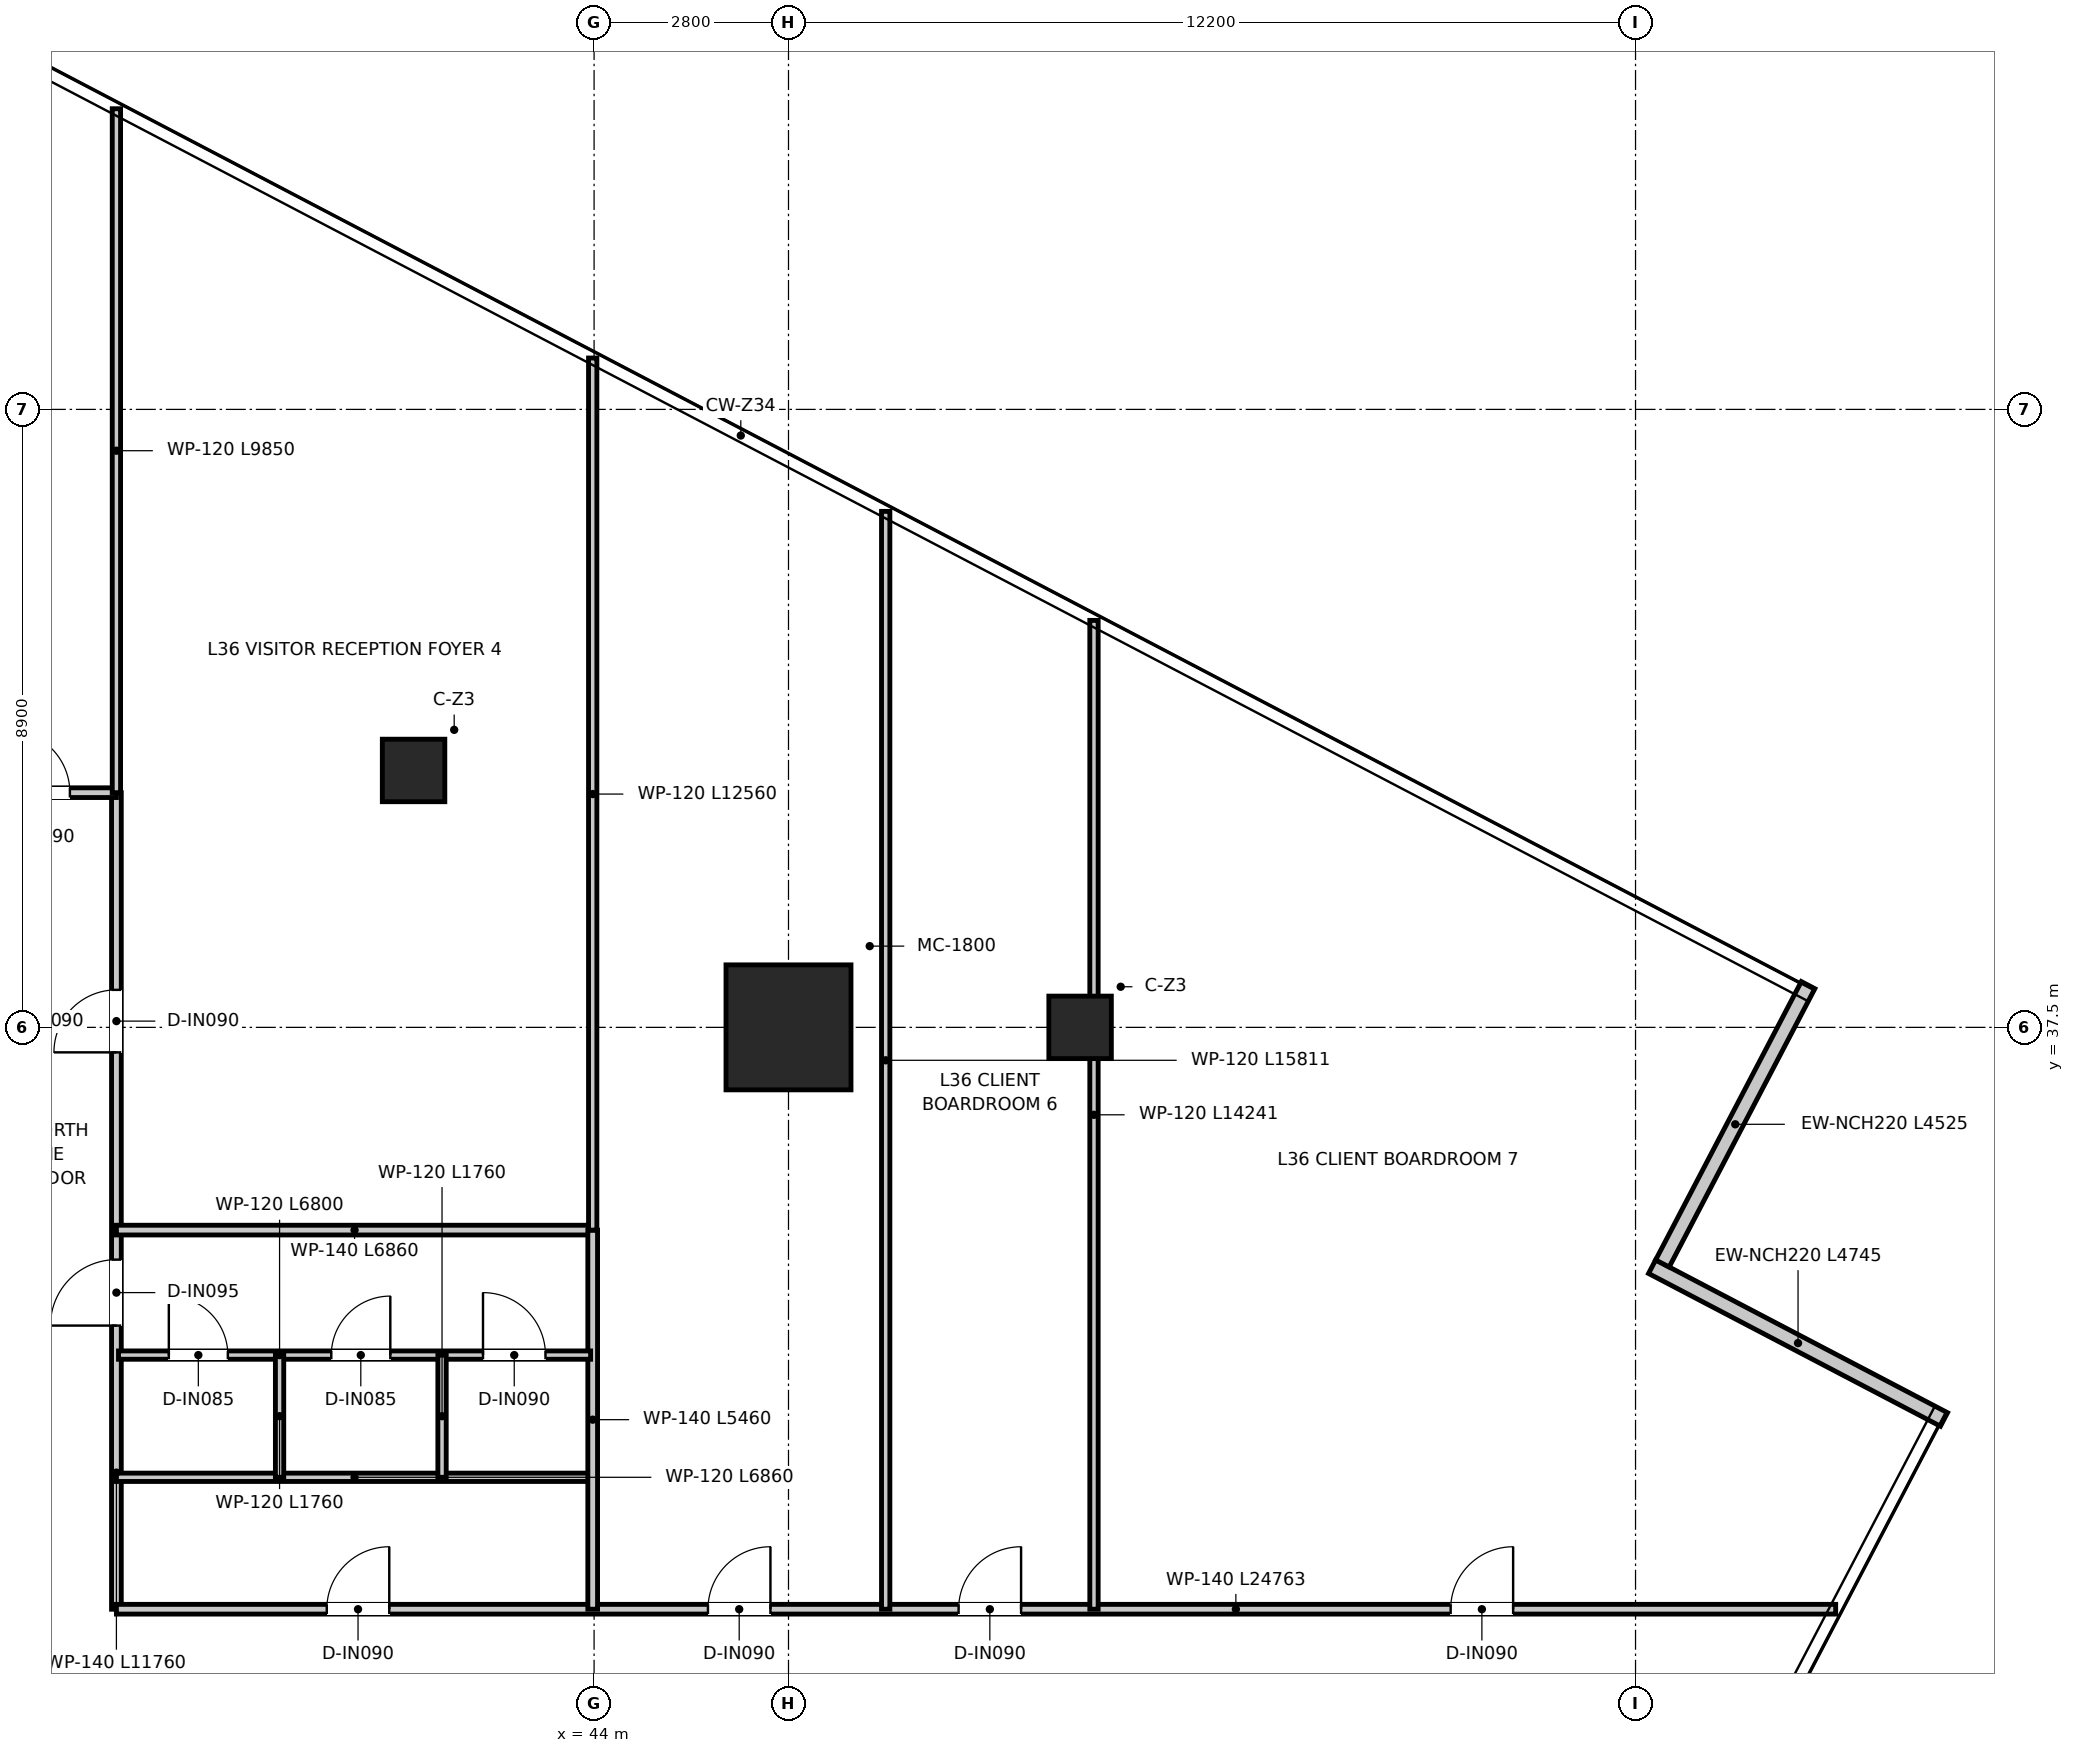
"""IFC4 building model, lengths in metres.
Left out: names, types, materials, properties, quantities, classifications, styles, units other than length and angle.
Written with IfcOpenShell. Run it as: python <this file> out.ifc"""

import sys

from ifc_helpers import new_model, si_unit, direction, frame, frame_2d, origin, origin_2d, place, context, subcontext, project, spatial, rectangle, extrude, source, transform, mapped, element, fill, save


model = new_model("IFC4")
c1 = context("Model", 3, precision=1e-05, world=origin(), true_north=direction((0.0, 1.0)))
c2 = subcontext(c1, "Body", "Model", "MODEL_VIEW")
j1 = project(units=[si_unit("LENGTHUNIT", "METRE"), si_unit("PLANEANGLEUNIT", "RADIAN")], contexts=[c1])
p1 = place(None, origin())
s1 = spatial("IfcSite", under=j1, at=p1, CompositionType="ELEMENT")
p2 = place(p1, origin())
s2 = spatial("IfcBuilding", under=s1, at=p2, CompositionType="ELEMENT")
p3 = place(p2, frame((0.0, 0.0, 150.15)))
s3 = spatial("IfcBuildingStorey", under=s2, at=p3, CompositionType="ELEMENT", Elevation=150.15)
m1 = source(origin(), c2, "Body", "SweptSolid", [
    extrude(rectangle(XDim=1.8, YDim=1.8, at=origin_2d()), origin(), (0.0, 0.0, 1.0), 3.95),
])
p4 = place(p3, frame((46.8, 37.5, 0.0), z_axis=(0.0, 0.0, 1.0), x_axis=(1.0, 0.0, 0.0)))
e1 = element("IfcColumn", 1, at=p4, inside=s3, PredefinedType="USERDEFINED", context=c2, shape_type="MappedRepresentation", body=[
    mapped(m1, transform((0.0, 0.0, 0.0), x_axis=(1.0, 0.0, 0.0), y_axis=(0.0, 1.0, 0.0), z_axis=(0.0, 0.0, 1.0), scale=1.0)),
])
m2 = source(origin(), c2, "Body", "SweptSolid", [
    extrude(rectangle(XDim=0.9, YDim=0.9, at=origin_2d()), origin(), (0.0, 0.0, 1.0), 3.95),
])
for number, where, z_axis, x_axis in (
    (2, (41.4, 41.2, 0.0), (0.0, 0.0, 1.0), (1.0, 0.0, 0.0)),
    (3, (51.0, 37.5, 0.0), (0.0, 0.0, 1.0), (1.0, 0.0, 0.0)),
):
    element("IfcColumn", number, at=place(p3, frame(where, z_axis=z_axis, x_axis=x_axis)), inside=s3, PredefinedType="COLUMN", context=c2, shape_type="MappedRepresentation", body=[
        mapped(m2, transform((0.0, 0.0, 0.0), x_axis=(1.0, 0.0, 0.0), y_axis=(0.0, 1.0, 0.0), z_axis=(0.0, 0.0, 1.0), scale=1.0)),
    ])
p5 = place(p3, frame((63.443, 31.853, 0.0), z_axis=(0.0, 0.0, 1.0), x_axis=(-0.886000663224, 0.463683970788, 0.0)))
e4 = element("IfcWall", 4, at=p5, inside=s3, PredefinedType="ELEMENTEDWALL", context=c2, shape_type="SweptSolid", body=[
    extrude(rectangle(XDim=4.745, YDim=0.22, at=frame_2d((2.373, 0.0))), origin(), (0.0, 0.0, 1.0), 3.67),
])
p6 = place(p3, frame((59.387, 34.099, 0.0), z_axis=(0.0, 0.0, 1.0), x_axis=(0.463690434653, 0.885997280363, 0.0)))
e5 = element("IfcWall", 5, at=p6, inside=s3, PredefinedType="ELEMENTEDWALL", context=c2, shape_type="SweptSolid", body=[
    extrude(rectangle(XDim=4.525, YDim=0.22, at=frame_2d((2.262, 0.0))), origin(), (0.0, 0.0, 1.0), 3.67),
])
p7 = place(p3, frame((37.12, 29.12, 0.0), z_axis=(0.0, 0.0, 1.0), x_axis=(0.0, 1.0, 0.0)))
e6 = element("IfcWall", 6, at=p7, inside=s3, PredefinedType="PARTITIONING", context=c2, shape_type="SweptSolid", body=[
    extrude(rectangle(XDim=11.76, YDim=0.14, at=frame_2d((5.88, 0.0))), origin(), (0.0, 0.0, 1.0), 3.03),
])
p8 = place(p7, frame((4.085, 0.0, 0.0)))
e7 = element("IfcOpeningElement", 7, at=p8, cuts=e6, PredefinedType="OPENING", context=c2, shape_type="SweptSolid", body=[
    extrude(rectangle(XDim=0.95, YDim=2.1, at=frame_2d((0.475, 1.05))), frame((0.0, 0.08, 0.0), z_axis=(0.0, -1.0, 0.0), x_axis=(1.0, 0.0, 0.0)), (0.0, 0.0, 1.0), 0.16),
])
p9 = place(p7, frame((8.02, 0.0, 0.0)))
e8 = element("IfcOpeningElement", 8, at=p9, cuts=e6, PredefinedType="OPENING", context=c2, shape_type="SweptSolid", body=[
    extrude(rectangle(XDim=0.9, YDim=2.1, at=frame_2d((0.45, 1.05))), frame((0.0, 0.08, 0.0), z_axis=(0.0, -1.0, 0.0), x_axis=(1.0, 0.0, 0.0)), (0.0, 0.0, 1.0), 0.16),
])
p10 = place(p3, frame((34.88, 40.88, 0.0), z_axis=(0.0, 0.0, 1.0), x_axis=(1.0, 0.0, 0.0)))
e9 = element("IfcWall", 9, at=p10, inside=s3, PredefinedType="PARTITIONING", context=c2, shape_type="SweptSolid", body=[
    extrude(rectangle(XDim=2.24, YDim=0.14, at=frame_2d((1.12, 0.0))), origin(), (0.0, 0.0, 1.0), 3.67),
])
p11 = place(p10, frame((0.67, 0.0, 0.0)))
e10 = element("IfcOpeningElement", 10, at=p11, cuts=e9, PredefinedType="OPENING", context=c2, shape_type="SweptSolid", body=[
    extrude(rectangle(XDim=0.9, YDim=2.1, at=frame_2d((0.45, 1.05))), frame((0.0, 0.08, 0.0), z_axis=(0.0, -1.0, 0.0), x_axis=(1.0, 0.0, 0.0)), (0.0, 0.0, 1.0), 0.16),
])
p12 = place(p3, frame((37.12, 29.12, 0.0), z_axis=(0.0, 0.0, 1.0), x_axis=(1.0, 0.0, 0.0)))
e11 = element("IfcWall", 11, at=p12, inside=s3, PredefinedType="PARTITIONING", context=c2, shape_type="SweptSolid", body=[
    extrude(rectangle(XDim=24.763, YDim=0.14, at=frame_2d((12.381, 0.0))), origin(), (0.0, 0.0, 1.0), 3.03),
])
p13 = place(p12, frame((3.03, 0.0, 0.0)))
e12 = element("IfcOpeningElement", 12, at=p13, cuts=e11, PredefinedType="OPENING", context=c2, shape_type="SweptSolid", body=[
    extrude(rectangle(XDim=0.9, YDim=2.1, at=frame_2d((0.45, 1.05))), frame((0.0, 0.08, 0.0), z_axis=(0.0, -1.0, 0.0), x_axis=(1.0, 0.0, 0.0)), (0.0, 0.0, 1.0), 0.16),
])
p14 = place(p12, frame((8.52, 0.0, 0.0)))
e13 = element("IfcOpeningElement", 13, at=p14, cuts=e11, PredefinedType="OPENING", context=c2, shape_type="SweptSolid", body=[
    extrude(rectangle(XDim=0.9, YDim=2.1, at=frame_2d((0.45, 1.05))), frame((0.0, 0.08, 0.0), z_axis=(0.0, -1.0, 0.0), x_axis=(1.0, 0.0, 0.0)), (0.0, 0.0, 1.0), 0.16),
])
p15 = place(p12, frame((12.13, 0.0, 0.0)))
e14 = element("IfcOpeningElement", 14, at=p15, cuts=e11, PredefinedType="OPENING", context=c2, shape_type="SweptSolid", body=[
    extrude(rectangle(XDim=0.9, YDim=2.1, at=frame_2d((0.45, 1.05))), frame((0.0, 0.08, 0.0), z_axis=(0.0, -1.0, 0.0), x_axis=(1.0, 0.0, 0.0)), (0.0, 0.0, 1.0), 0.16),
])
p16 = place(p12, frame((19.217, 0.0, 0.0)))
e15 = element("IfcOpeningElement", 15, at=p16, cuts=e11, PredefinedType="OPENING", context=c2, shape_type="SweptSolid", body=[
    extrude(rectangle(XDim=0.9, YDim=2.1, at=frame_2d((0.45, 1.05))), frame((0.0, 0.08, 0.0), z_axis=(0.0, -1.0, 0.0), x_axis=(1.0, 0.0, 0.0)), (0.0, 0.0, 1.0), 0.16),
])
p17 = place(p3, frame((37.12, 31.02, 0.0), z_axis=(0.0, 0.0, 1.0), x_axis=(1.0, 0.0, 0.0)))
e16 = element("IfcWall", 16, at=p17, inside=s3, PredefinedType="PARTITIONING", context=c2, shape_type="SweptSolid", body=[
    extrude(rectangle(XDim=6.86, YDim=0.12, at=frame_2d((3.43, 0.0))), origin(), (0.0, 0.0, 1.0), 3.08),
])
p18 = place(p3, frame((37.12, 34.58, 0.0), z_axis=(0.0, 0.0, 1.0), x_axis=(1.0, 0.0, 0.0)))
e17 = element("IfcWall", 17, at=p18, inside=s3, PredefinedType="PARTITIONING", context=c2, shape_type="SweptSolid", body=[
    extrude(rectangle(XDim=6.86, YDim=0.14, at=frame_2d((3.43, 0.0))), origin(), (0.0, 0.0, 1.0), 3.08),
])
p19 = place(p3, frame((43.98, 29.12, 0.0), z_axis=(0.0, 0.0, 1.0), x_axis=(0.0, 1.0, 0.0)))
e18 = element("IfcWall", 18, at=p19, inside=s3, PredefinedType="PARTITIONING", context=c2, shape_type="SweptSolid", body=[
    extrude(rectangle(XDim=5.46, YDim=0.14, at=frame_2d((2.73, 0.0))), origin(), (0.0, 0.0, 1.0), 3.31),
])
p20 = place(p3, frame((37.15, 32.78, 0.0), z_axis=(0.0, 0.0, 1.0), x_axis=(1.0, 0.0, 0.0)))
e19 = element("IfcWall", 19, at=p20, inside=s3, PredefinedType="PARTITIONING", context=c2, shape_type="SweptSolid", body=[
    extrude(rectangle(XDim=6.8, YDim=0.12, at=frame_2d((3.4, 0.0))), origin(), (0.0, 0.0, 1.0), 3.08),
])
p21 = place(p20, frame((0.725, 0.0, 0.0)))
e20 = element("IfcOpeningElement", 20, at=p21, cuts=e19, PredefinedType="OPENING", context=c2, shape_type="SweptSolid", body=[
    extrude(rectangle(XDim=0.85, YDim=2.1, at=frame_2d((0.425, 1.05))), frame((0.0, 0.07, 0.0), z_axis=(0.0, -1.0, 0.0), x_axis=(1.0, 0.0, 0.0)), (0.0, 0.0, 1.0), 0.14),
])
p22 = place(p20, frame((3.065, 0.0, 0.0)))
e21 = element("IfcOpeningElement", 21, at=p22, cuts=e19, PredefinedType="OPENING", context=c2, shape_type="SweptSolid", body=[
    extrude(rectangle(XDim=0.85, YDim=2.1, at=frame_2d((0.425, 1.05))), frame((0.0, 0.07, 0.0), z_axis=(0.0, -1.0, 0.0), x_axis=(1.0, 0.0, 0.0)), (0.0, 0.0, 1.0), 0.14),
])
p23 = place(p20, frame((5.25, 0.0, 0.0)))
e22 = element("IfcOpeningElement", 22, at=p23, cuts=e19, PredefinedType="OPENING", context=c2, shape_type="SweptSolid", body=[
    extrude(rectangle(XDim=0.9, YDim=2.1, at=frame_2d((0.45, 1.05))), frame((0.0, 0.07, 0.0), z_axis=(0.0, -1.0, 0.0), x_axis=(1.0, 0.0, 0.0)), (0.0, 0.0, 1.0), 0.14),
])
for number, where, z_axis, x_axis in (
    (23, (39.47, 31.02, 0.0), (0.0, 0.0, 1.0), (0.0, 1.0, 0.0)),
    (24, (41.81, 31.02, 0.0), (0.0, 0.0, 1.0), (0.0, 1.0, 0.0)),
):
    element("IfcWall", number, at=place(p3, frame(where, z_axis=z_axis, x_axis=x_axis)), inside=s3, PredefinedType="PARTITIONING", context=c2, shape_type="SweptSolid", body=[
        extrude(rectangle(XDim=1.76, YDim=0.12, at=frame_2d((0.88, 0.0))), origin(), (0.0, 0.0, 1.0), 3.67),
    ])
p24 = place(p3, frame((37.12, 40.88, 0.0), z_axis=(0.0, 0.0, 1.0), x_axis=(0.0, 1.0, 0.0)))
e25 = element("IfcWall", 25, at=p24, inside=s3, PredefinedType="PARTITIONING", context=c2, shape_type="SweptSolid", body=[
    extrude(rectangle(XDim=9.85, YDim=0.12, at=frame_2d((4.925, 0.0))), origin(), (0.0, 0.0, 1.0), 3.28),
])
p25 = place(p3, frame((43.98, 34.58, 0.0), z_axis=(0.0, 0.0, 1.0), x_axis=(0.0, 1.0, 0.0)))
e26 = element("IfcWall", 26, at=p25, inside=s3, PredefinedType="PARTITIONING", context=c2, shape_type="SweptSolid", body=[
    extrude(rectangle(XDim=12.56, YDim=0.12, at=frame_2d((6.28, 0.0))), origin(), (0.0, 0.0, 1.0), 3.03),
])
p26 = place(p3, frame((48.2, 29.12, 0.0), z_axis=(0.0, 0.0, 1.0), x_axis=(0.0, 1.0, 0.0)))
e27 = element("IfcWall", 27, at=p26, inside=s3, PredefinedType="PARTITIONING", context=c2, shape_type="SweptSolid", body=[
    extrude(rectangle(XDim=15.811, YDim=0.12, at=frame_2d((7.906, 0.0))), origin(), (0.0, 0.0, 1.0), 3.08),
])
p27 = place(p3, frame((51.2, 29.12, 0.0), z_axis=(0.0, 0.0, 1.0), x_axis=(0.0, 1.0, 0.0)))
e28 = element("IfcWall", 28, at=p27, inside=s3, PredefinedType="PARTITIONING", context=c2, shape_type="SweptSolid", body=[
    extrude(rectangle(XDim=14.241, YDim=0.12, at=frame_2d((7.121, 0.0))), origin(), (0.0, 0.0, 1.0), 3.28),
])
p28 = place(p13, origin())
e29 = element("IfcDoor", 29, at=p28, inside=s3, OperationType="SINGLE_SWING_RIGHT", PredefinedType="DOOR", context=c2, shape_type="SweptSolid", body=[
    extrude(rectangle(XDim=0.9, YDim=2.1, at=frame_2d((0.45, 1.05))), frame((0.0, 0.025, 0.0), z_axis=(0.0, -1.0, 0.0), x_axis=(1.0, 0.0, 0.0)), (0.0, 0.0, 1.0), 0.05),
])
fill(e12, e29)
p29 = place(p8, origin())
e30 = element("IfcDoor", 30, at=p29, inside=s3, OperationType="SINGLE_SWING_LEFT", PredefinedType="DOOR", context=c2, shape_type="SweptSolid", body=[
    extrude(rectangle(XDim=0.95, YDim=2.1, at=frame_2d((0.475, 1.05))), frame((0.0, 0.025, 0.0), z_axis=(0.0, -1.0, 0.0), x_axis=(1.0, 0.0, 0.0)), (0.0, 0.0, 1.0), 0.05),
])
fill(e7, e30)
p30 = place(p21, origin())
e31 = element("IfcDoor", 31, at=p30, inside=s3, OperationType="SINGLE_SWING_LEFT", PredefinedType="DOOR", context=c2, shape_type="SweptSolid", body=[
    extrude(rectangle(XDim=0.85, YDim=2.1, at=frame_2d((0.425, 1.05))), frame((0.0, 0.025, 0.0), z_axis=(0.0, -1.0, 0.0), x_axis=(1.0, 0.0, 0.0)), (0.0, 0.0, 1.0), 0.05),
])
fill(e20, e31)
p31 = place(p22, origin())
e32 = element("IfcDoor", 32, at=p31, inside=s3, OperationType="SINGLE_SWING_RIGHT", PredefinedType="DOOR", context=c2, shape_type="SweptSolid", body=[
    extrude(rectangle(XDim=0.85, YDim=2.1, at=frame_2d((0.425, 1.05))), frame((0.0, 0.025, 0.0), z_axis=(0.0, -1.0, 0.0), x_axis=(1.0, 0.0, 0.0)), (0.0, 0.0, 1.0), 0.05),
])
fill(e21, e32)
p32 = place(p23, origin())
e33 = element("IfcDoor", 33, at=p32, inside=s3, OperationType="SINGLE_SWING_LEFT", PredefinedType="DOOR", context=c2, shape_type="SweptSolid", body=[
    extrude(rectangle(XDim=0.9, YDim=2.1, at=frame_2d((0.45, 1.05))), frame((0.0, 0.025, 0.0), z_axis=(0.0, -1.0, 0.0), x_axis=(1.0, 0.0, 0.0)), (0.0, 0.0, 1.0), 0.05),
])
fill(e22, e33)
p33 = place(p11, origin())
e34 = element("IfcDoor", 34, at=p33, inside=s3, OperationType="SINGLE_SWING_LEFT", PredefinedType="DOOR", context=c2, shape_type="SweptSolid", body=[
    extrude(rectangle(XDim=0.9, YDim=2.1, at=frame_2d((0.45, 1.05))), frame((0.0, 0.025, 0.0), z_axis=(0.0, -1.0, 0.0), x_axis=(1.0, 0.0, 0.0)), (0.0, 0.0, 1.0), 0.05),
])
fill(e10, e34)
p34 = place(p9, origin())
e35 = element("IfcDoor", 35, at=p34, inside=s3, OperationType="SINGLE_SWING_LEFT", PredefinedType="DOOR", context=c2, shape_type="SweptSolid", body=[
    extrude(rectangle(XDim=0.9, YDim=2.1, at=frame_2d((0.45, 1.05))), frame((0.0, 0.025, 0.0), z_axis=(0.0, -1.0, 0.0), x_axis=(1.0, 0.0, 0.0)), (0.0, 0.0, 1.0), 0.05),
])
fill(e8, e35)
p35 = place(p14, origin())
e36 = element("IfcDoor", 36, at=p35, inside=s3, OperationType="SINGLE_SWING_RIGHT", PredefinedType="DOOR", context=c2, shape_type="SweptSolid", body=[
    extrude(rectangle(XDim=0.9, YDim=2.1, at=frame_2d((0.45, 1.05))), frame((0.0, 0.025, 0.0), z_axis=(0.0, -1.0, 0.0), x_axis=(1.0, 0.0, 0.0)), (0.0, 0.0, 1.0), 0.05),
])
fill(e13, e36)
p36 = place(p15, origin())
e37 = element("IfcDoor", 37, at=p36, inside=s3, OperationType="SINGLE_SWING_RIGHT", PredefinedType="DOOR", context=c2, shape_type="SweptSolid", body=[
    extrude(rectangle(XDim=0.9, YDim=2.1, at=frame_2d((0.45, 1.05))), frame((0.0, 0.025, 0.0), z_axis=(0.0, -1.0, 0.0), x_axis=(1.0, 0.0, 0.0)), (0.0, 0.0, 1.0), 0.05),
])
fill(e14, e37)
p37 = place(p16, origin())
e38 = element("IfcDoor", 38, at=p37, inside=s3, OperationType="SINGLE_SWING_RIGHT", PredefinedType="DOOR", context=c2, shape_type="SweptSolid", body=[
    extrude(rectangle(XDim=0.9, YDim=2.1, at=frame_2d((0.45, 1.05))), frame((0.0, 0.025, 0.0), z_axis=(0.0, -1.0, 0.0), x_axis=(1.0, 0.0, 0.0)), (0.0, 0.0, 1.0), 0.05),
])
fill(e15, e38)
save(model, sys.argv[1])
